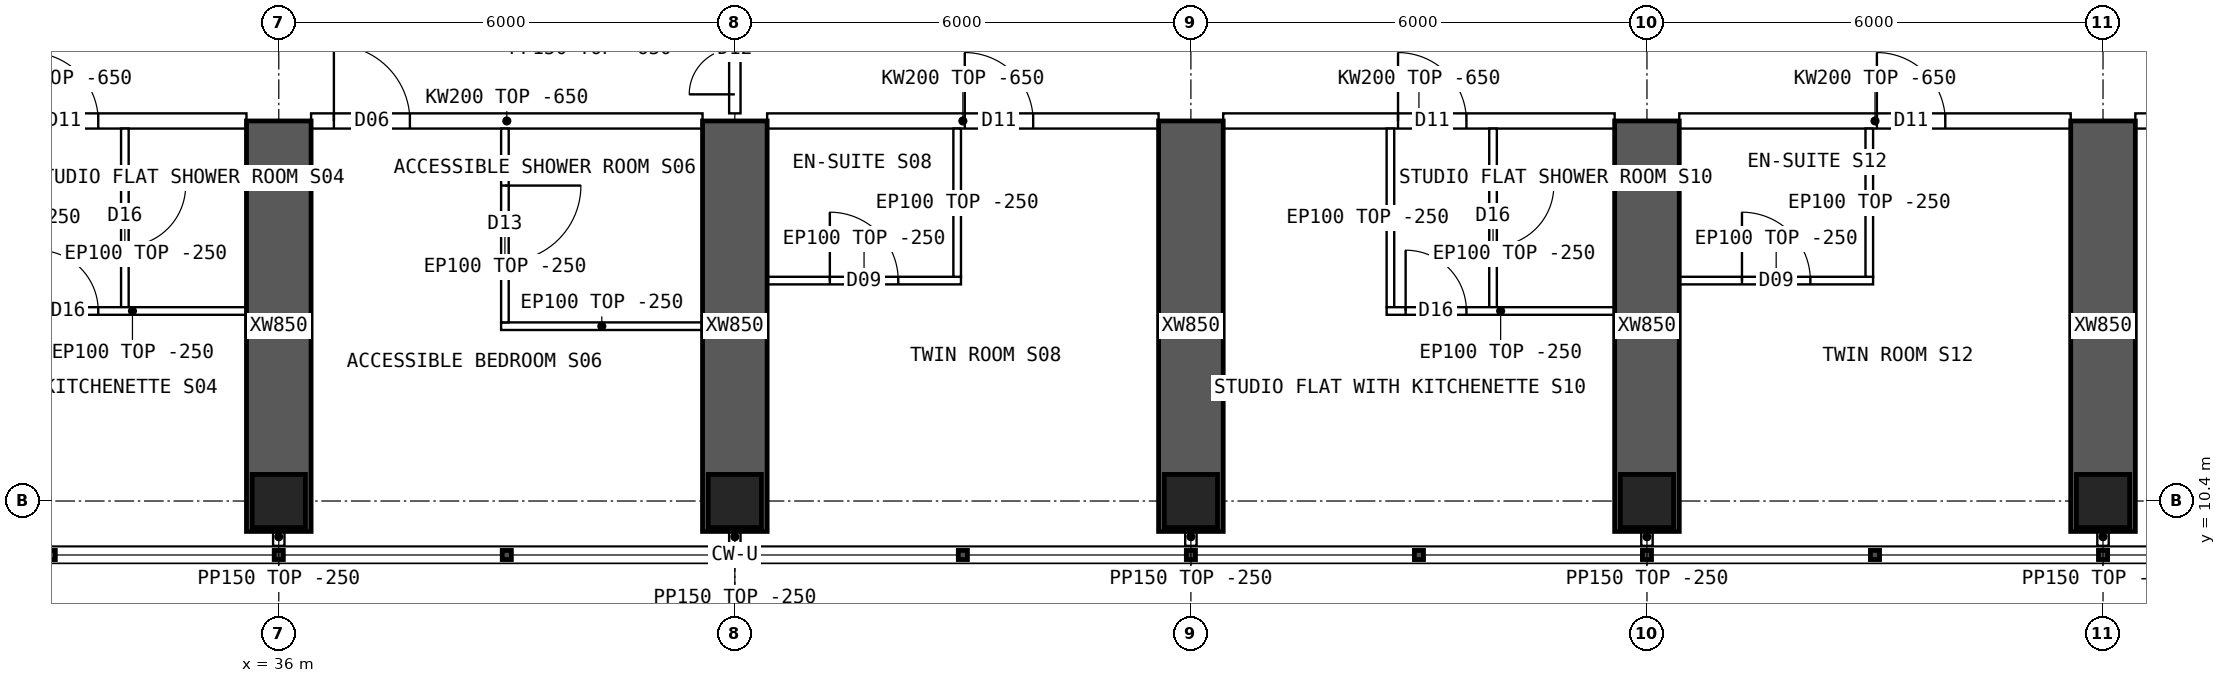
"""IFC4 building model, lengths in metres.
Left out: names, types, materials, properties, quantities, classifications, styles, units other than length and angle.
Written with IfcOpenShell. Run it as: python <this file> out.ifc"""

import sys

from ifc_helpers import new_model, si_unit, direction, frame, frame_2d, origin, origin_2d, place, context, subcontext, project, spatial, polyline, rectangle, hollow_rectangle, outline, extrude, element, fill, save


model = new_model("IFC4")
c1 = context("Model", 3, precision=1e-05, world=origin(), true_north=direction((0.0, 1.0)))
c2 = subcontext(c1, "Body", "Model", "MODEL_VIEW")
j1 = project(units=[si_unit("LENGTHUNIT", "METRE"), si_unit("PLANEANGLEUNIT", "RADIAN")], contexts=[c1])
p1 = place(None, origin())
s1 = spatial("IfcSite", under=j1, at=p1, CompositionType="ELEMENT")
p2 = place(p1, origin())
s2 = spatial("IfcBuilding", under=s1, at=p2, CompositionType="ELEMENT")
p3 = place(p2, frame((0.0, 0.0, 156.1)))
s3 = spatial("IfcBuildingStorey", under=s2, at=p3, CompositionType="ELEMENT", Elevation=156.1)
for number, where, z_axis, x_axis in (
    (1, (36.0, 10.4, 0.0), (0.0, 0.0, 1.0), (1.0, 0.0, 0.0)),
    (2, (42.0, 10.4, 0.0), (0.0, 0.0, 1.0), (1.0, 0.0, 0.0)),
    (3, (48.0, 10.4, 0.0), (0.0, 0.0, 1.0), (1.0, 0.0, 0.0)),
    (4, (54.0, 10.4, 0.0), (0.0, 0.0, 1.0), (1.0, 0.0, 0.0)),
    (5, (60.0, 10.4, 0.0), (0.0, 0.0, 1.0), (1.0, 0.0, 0.0)),
):
    element("IfcColumn", number, at=place(p3, frame(where, z_axis=z_axis, x_axis=x_axis)), inside=s3, PredefinedType="COLUMN", context=c2, shape_type="SweptSolid", body=[
        extrude(hollow_rectangle(XDim=0.7, YDim=0.7, WallThickness=0.07, at=origin_2d()), origin(), (0.0, 0.0, 1.0), 3.75),
    ])
for number, where, z_axis, x_axis in (
    (6, (36.0, 10.0, 0.0), (0.0, 0.0, 1.0), (0.0, 1.0, 0.0)),
    (7, (42.0, 10.0, 0.0), (0.0, 0.0, 1.0), (0.0, 1.0, 0.0)),
    (8, (48.0, 10.0, 0.0), (0.0, 0.0, 1.0), (0.0, 1.0, 0.0)),
    (9, (54.0, 10.0, 0.0), (0.0, 0.0, 1.0), (0.0, 1.0, 0.0)),
    (10, (60.0, 10.0, 0.0), (0.0, 0.0, 1.0), (0.0, 1.0, 0.0)),
):
    element("IfcWall", number, at=place(p3, frame(where, z_axis=z_axis, x_axis=x_axis)), inside=s3, PredefinedType="SHEAR", context=c2, shape_type="SweptSolid", body=[
        extrude(rectangle(XDim=5.4, YDim=0.85, at=frame_2d((2.7, 0.0))), origin(), (0.0, 0.0, 1.0), 3.75),
    ])
p4 = place(p3, frame((30.425, 15.4, 0.0), z_axis=(0.0, 0.0, 1.0), x_axis=(1.0, 0.0, 0.0)))
e11 = element("IfcWall", 11, at=p4, inside=s3, PredefinedType="SOLIDWALL", context=c2, shape_type="SweptSolid", body=[
    extrude(outline(polyline([(0.0, 0.0), (5.15, 0.0), (5.15, 3.1), (0.0, 3.1), (0.0, 0.0)])), frame((0.0, 0.1, 0.0), z_axis=(0.0, -1.0, 0.0), x_axis=(1.0, 0.0, 0.0)), (0.0, 0.0, 1.0), 0.2),
])
p5 = place(p4, frame((2.3, 0.0, 0.0)))
e12 = element("IfcOpeningElement", 12, at=p5, cuts=e11, PredefinedType="OPENING", context=c2, shape_type="SweptSolid", body=[
    extrude(rectangle(XDim=0.9, YDim=2.1, at=frame_2d((0.45, 1.05))), frame((0.0, 0.11, 0.0), z_axis=(0.0, -1.0, 0.0), x_axis=(1.0, 0.0, 0.0)), (0.0, 0.0, 1.0), 0.22),
])
p6 = place(p3, frame((36.425, 15.4, 0.0), z_axis=(0.0, 0.0, 1.0), x_axis=(1.0, 0.0, 0.0)))
e13 = element("IfcWall", 13, at=p6, inside=s3, PredefinedType="SOLIDWALL", context=c2, shape_type="SweptSolid", body=[
    extrude(outline(polyline([(0.0, 0.0), (5.15, 0.0), (5.15, 3.1), (0.0, 3.1), (0.0, 0.0)])), frame((0.0, 0.1, 0.0), z_axis=(0.0, -1.0, 0.0), x_axis=(1.0, 0.0, 0.0)), (0.0, 0.0, 1.0), 0.2),
])
p7 = place(p6, frame((0.3, 0.0, 0.0)))
e14 = element("IfcOpeningElement", 14, at=p7, cuts=e13, PredefinedType="OPENING", context=c2, shape_type="SweptSolid", body=[
    extrude(rectangle(XDim=1.0, YDim=2.1, at=frame_2d((0.5, 1.05))), frame((0.0, 0.11, 0.0), z_axis=(0.0, -1.0, 0.0), x_axis=(1.0, 0.0, 0.0)), (0.0, 0.0, 1.0), 0.22),
])
p8 = place(p3, frame((42.425, 15.4, 0.0), z_axis=(0.0, 0.0, 1.0), x_axis=(1.0, 0.0, 0.0)))
e15 = element("IfcWall", 15, at=p8, inside=s3, PredefinedType="SOLIDWALL", context=c2, shape_type="SweptSolid", body=[
    extrude(outline(polyline([(0.0, 0.0), (5.15, 0.0), (5.15, 3.1), (0.0, 3.1), (0.0, 0.0)])), frame((0.0, 0.1, 0.0), z_axis=(0.0, -1.0, 0.0), x_axis=(1.0, 0.0, 0.0)), (0.0, 0.0, 1.0), 0.2),
])
p9 = place(p8, frame((2.6, 0.0, 0.0)))
e16 = element("IfcOpeningElement", 16, at=p9, cuts=e15, PredefinedType="OPENING", context=c2, shape_type="SweptSolid", body=[
    extrude(rectangle(XDim=0.9, YDim=2.1, at=frame_2d((0.45, 1.05))), frame((0.0, 0.11, 0.0), z_axis=(0.0, -1.0, 0.0), x_axis=(1.0, 0.0, 0.0)), (0.0, 0.0, 1.0), 0.22),
])
p10 = place(p3, frame((48.425, 15.4, 0.0), z_axis=(0.0, 0.0, 1.0), x_axis=(1.0, 0.0, 0.0)))
e17 = element("IfcWall", 17, at=p10, inside=s3, PredefinedType="SOLIDWALL", context=c2, shape_type="SweptSolid", body=[
    extrude(outline(polyline([(0.0, 0.0), (5.15, 0.0), (5.15, 3.1), (0.0, 3.1), (0.0, 0.0)])), frame((0.0, 0.1, 0.0), z_axis=(0.0, -1.0, 0.0), x_axis=(1.0, 0.0, 0.0)), (0.0, 0.0, 1.0), 0.2),
])
p11 = place(p10, frame((2.3, 0.0, 0.0)))
e18 = element("IfcOpeningElement", 18, at=p11, cuts=e17, PredefinedType="OPENING", context=c2, shape_type="SweptSolid", body=[
    extrude(rectangle(XDim=0.9, YDim=2.1, at=frame_2d((0.45, 1.05))), frame((0.0, 0.11, 0.0), z_axis=(0.0, -1.0, 0.0), x_axis=(1.0, 0.0, 0.0)), (0.0, 0.0, 1.0), 0.22),
])
p12 = place(p3, frame((54.425, 15.4, 0.0), z_axis=(0.0, 0.0, 1.0), x_axis=(1.0, 0.0, 0.0)))
e19 = element("IfcWall", 19, at=p12, inside=s3, PredefinedType="SOLIDWALL", context=c2, shape_type="SweptSolid", body=[
    extrude(outline(polyline([(0.0, 0.0), (5.15, 0.0), (5.15, 3.1), (0.0, 3.1), (0.0, 0.0)])), frame((0.0, 0.1, 0.0), z_axis=(0.0, -1.0, 0.0), x_axis=(1.0, 0.0, 0.0)), (0.0, 0.0, 1.0), 0.2),
])
p13 = place(p12, frame((2.6, 0.0, 0.0)))
e20 = element("IfcOpeningElement", 20, at=p13, cuts=e19, PredefinedType="OPENING", context=c2, shape_type="SweptSolid", body=[
    extrude(rectangle(XDim=0.9, YDim=2.1, at=frame_2d((0.45, 1.05))), frame((0.0, 0.11, 0.0), z_axis=(0.0, -1.0, 0.0), x_axis=(1.0, 0.0, 0.0)), (0.0, 0.0, 1.0), 0.22),
])
p14 = place(p3, frame((60.425, 15.4, 0.0), z_axis=(0.0, 0.0, 1.0), x_axis=(1.0, 0.0, 0.0)))
e21 = element("IfcWall", 21, at=p14, inside=s3, PredefinedType="SOLIDWALL", context=c2, shape_type="SweptSolid", body=[
    extrude(outline(polyline([(0.0, 0.0), (5.15, 0.0), (5.15, 3.1), (0.0, 3.1), (0.0, 0.0)])), frame((0.0, 0.1, 0.0), z_axis=(0.0, -1.0, 0.0), x_axis=(1.0, 0.0, 0.0)), (0.0, 0.0, 1.0), 0.2),
])
p15 = place(p14, frame((0.6, 0.0, 0.0)))
e22 = element("IfcOpeningElement", 22, at=p15, cuts=e21, PredefinedType="OPENING", context=c2, shape_type="SweptSolid", body=[
    extrude(rectangle(XDim=1.0, YDim=2.1, at=frame_2d((0.5, 1.05))), frame((0.0, 0.11, 0.0), z_axis=(0.0, -1.0, 0.0), x_axis=(1.0, 0.0, 0.0)), (0.0, 0.0, 1.0), 0.22),
])
p16 = place(p3, frame((35.575, 12.9, 0.0), z_axis=(0.0, 0.0, 1.0), x_axis=(-1.0, 0.0, 0.0)))
e23 = element("IfcWall", 23, at=p16, inside=s3, PredefinedType="PARTITIONING", context=c2, shape_type="SweptSolid", body=[
    extrude(rectangle(XDim=3.0, YDim=0.1, at=frame_2d((1.5, 0.0))), origin(), (0.0, 0.0, 1.0), 3.5),
])
p17 = place(p16, frame((1.95, 0.0, 0.0)))
e24 = element("IfcOpeningElement", 24, at=p17, cuts=e23, PredefinedType="OPENING", context=c2, shape_type="SweptSolid", body=[
    extrude(rectangle(XDim=0.8, YDim=2.1, at=frame_2d((0.4, 1.05))), frame((0.0, 0.06, 0.0), z_axis=(0.0, -1.0, 0.0), x_axis=(1.0, 0.0, 0.0)), (0.0, 0.0, 1.0), 0.12),
])
p18 = place(p3, frame((33.975, 12.95, 0.0), z_axis=(0.0, 0.0, 1.0), x_axis=(0.0, 1.0, 0.0)))
e25 = element("IfcWall", 25, at=p18, inside=s3, PredefinedType="PARTITIONING", context=c2, shape_type="SweptSolid", body=[
    extrude(outline(polyline([(0.0, 0.0), (2.35, 0.0), (2.35, 3.1), (2.302, 3.1), (2.3, 3.5), (0.0, 3.5), (0.0, 0.0)])), frame((0.0, 0.05, 0.0), z_axis=(0.0, -1.0, 0.0), x_axis=(1.0, 0.0, 0.0)), (0.0, 0.0, 1.0), 0.1),
])
p19 = place(p18, frame((0.8, 0.0, 0.0)))
e26 = element("IfcOpeningElement", 26, at=p19, cuts=e25, PredefinedType="OPENING", context=c2, shape_type="SweptSolid", body=[
    extrude(rectangle(XDim=0.8, YDim=2.1, at=frame_2d((0.4, 1.05))), frame((0.0, 0.06, 0.0), z_axis=(0.0, -1.0, 0.0), x_axis=(1.0, 0.0, 0.0)), (0.0, 0.0, 1.0), 0.12),
])
p20 = place(p3, frame((38.925, 12.7, 0.0), z_axis=(0.0, 0.0, 1.0), x_axis=(1.0, 0.0, 0.0)))
e27 = element("IfcWall", 27, at=p20, inside=s3, PredefinedType="PARTITIONING", context=c2, shape_type="SweptSolid", body=[
    extrude(rectangle(XDim=2.65, YDim=0.1, at=frame_2d((1.325, 0.0))), origin(), (0.0, 0.0, 1.0), 3.5),
])
p21 = place(p3, frame((38.975, 12.75, 0.0), z_axis=(0.0, 0.0, 1.0), x_axis=(0.0, 1.0, 0.0)))
e28 = element("IfcWall", 28, at=p21, inside=s3, PredefinedType="PARTITIONING", context=c2, shape_type="SweptSolid", body=[
    extrude(outline(polyline([(0.0, 0.0), (2.55, 0.0), (2.55, 3.1), (2.502, 3.1), (2.5, 3.5), (0.0, 3.5), (0.0, 0.0)])), frame((0.0, 0.05, 0.0), z_axis=(0.0, -1.0, 0.0), x_axis=(1.0, 0.0, 0.0)), (0.0, 0.0, 1.0), 0.1),
])
p22 = place(p21, frame((0.8, 0.0, 0.0)))
e29 = element("IfcOpeningElement", 29, at=p22, cuts=e28, PredefinedType="OPENING", context=c2, shape_type="SweptSolid", body=[
    extrude(rectangle(XDim=1.0, YDim=2.1, at=frame_2d((0.5, 1.05))), frame((0.0, 0.06, 0.0), z_axis=(0.0, -1.0, 0.0), x_axis=(1.0, 0.0, 0.0)), (0.0, 0.0, 1.0), 0.12),
])
p23 = place(p3, frame((44.975, 13.3, 0.0), z_axis=(0.0, 0.0, 1.0), x_axis=(-1.0, 0.0, 0.0)))
e30 = element("IfcWall", 30, at=p23, inside=s3, PredefinedType="PARTITIONING", context=c2, shape_type="SweptSolid", body=[
    extrude(rectangle(XDim=2.55, YDim=0.1, at=frame_2d((1.275, 0.0))), origin(), (0.0, 0.0, 1.0), 3.5),
])
p24 = place(p23, frame((0.825, 0.0, 0.0)))
e31 = element("IfcOpeningElement", 31, at=p24, cuts=e30, PredefinedType="OPENING", context=c2, shape_type="SweptSolid", body=[
    extrude(rectangle(XDim=0.9, YDim=2.1, at=frame_2d((0.45, 1.05))), frame((0.0, 0.06, 0.0), z_axis=(0.0, -1.0, 0.0), x_axis=(1.0, 0.0, 0.0)), (0.0, 0.0, 1.0), 0.12),
])
p25 = place(p3, frame((44.925, 13.35, 0.0), z_axis=(0.0, 0.0, 1.0), x_axis=(0.0, 1.0, 0.0)))
e32 = element("IfcWall", 32, at=p25, inside=s3, PredefinedType="PARTITIONING", context=c2, shape_type="SweptSolid", body=[
    extrude(outline(polyline([(0.0, 0.0), (1.95, 0.0), (1.95, 3.1), (1.902, 3.1), (1.9, 3.5), (0.0, 3.5), (0.0, 0.0)])), frame((0.0, 0.05, 0.0), z_axis=(0.0, -1.0, 0.0), x_axis=(1.0, 0.0, 0.0)), (0.0, 0.0, 1.0), 0.1),
])
p26 = place(p3, frame((53.575, 12.9, 0.0), z_axis=(0.0, 0.0, 1.0), x_axis=(-1.0, 0.0, 0.0)))
e33 = element("IfcWall", 33, at=p26, inside=s3, PredefinedType="PARTITIONING", context=c2, shape_type="SweptSolid", body=[
    extrude(rectangle(XDim=3.0, YDim=0.1, at=frame_2d((1.5, 0.0))), origin(), (0.0, 0.0, 1.0), 3.5),
])
p27 = place(p26, frame((1.95, 0.0, 0.0)))
e34 = element("IfcOpeningElement", 34, at=p27, cuts=e33, PredefinedType="OPENING", context=c2, shape_type="SweptSolid", body=[
    extrude(rectangle(XDim=0.8, YDim=2.1, at=frame_2d((0.4, 1.05))), frame((0.0, 0.06, 0.0), z_axis=(0.0, -1.0, 0.0), x_axis=(1.0, 0.0, 0.0)), (0.0, 0.0, 1.0), 0.12),
])
p28 = place(p3, frame((50.625, 12.95, 0.0), z_axis=(0.0, 0.0, 1.0), x_axis=(0.0, 1.0, 0.0)))
e35 = element("IfcWall", 35, at=p28, inside=s3, PredefinedType="PARTITIONING", context=c2, shape_type="SweptSolid", body=[
    extrude(outline(polyline([(0.0, 0.0), (2.35, 0.0), (2.35, 3.1), (2.302, 3.1), (2.3, 3.5), (0.0, 3.5), (0.0, 0.0)])), frame((0.0, 0.05, 0.0), z_axis=(0.0, -1.0, 0.0), x_axis=(1.0, 0.0, 0.0)), (0.0, 0.0, 1.0), 0.1),
])
p29 = place(p3, frame((51.975, 12.95, 0.0), z_axis=(0.0, 0.0, 1.0), x_axis=(0.0, 1.0, 0.0)))
e36 = element("IfcWall", 36, at=p29, inside=s3, PredefinedType="PARTITIONING", context=c2, shape_type="SweptSolid", body=[
    extrude(outline(polyline([(0.0, 0.0), (2.35, 0.0), (2.35, 3.1), (2.302, 3.1), (2.3, 3.5), (0.0, 3.5), (0.0, 0.0)])), frame((0.0, 0.05, 0.0), z_axis=(0.0, -1.0, 0.0), x_axis=(1.0, 0.0, 0.0)), (0.0, 0.0, 1.0), 0.1),
])
p30 = place(p29, frame((0.8, 0.0, 0.0)))
e37 = element("IfcOpeningElement", 37, at=p30, cuts=e36, PredefinedType="OPENING", context=c2, shape_type="SweptSolid", body=[
    extrude(rectangle(XDim=0.8, YDim=2.1, at=frame_2d((0.4, 1.05))), frame((0.0, 0.06, 0.0), z_axis=(0.0, -1.0, 0.0), x_axis=(1.0, 0.0, 0.0)), (0.0, 0.0, 1.0), 0.12),
])
p31 = place(p3, frame((56.975, 13.3, 0.0), z_axis=(0.0, 0.0, 1.0), x_axis=(-1.0, 0.0, 0.0)))
e38 = element("IfcWall", 38, at=p31, inside=s3, PredefinedType="PARTITIONING", context=c2, shape_type="SweptSolid", body=[
    extrude(rectangle(XDim=2.55, YDim=0.1, at=frame_2d((1.275, 0.0))), origin(), (0.0, 0.0, 1.0), 3.5),
])
p32 = place(p31, frame((0.825, 0.0, 0.0)))
e39 = element("IfcOpeningElement", 39, at=p32, cuts=e38, PredefinedType="OPENING", context=c2, shape_type="SweptSolid", body=[
    extrude(rectangle(XDim=0.9, YDim=2.1, at=frame_2d((0.45, 1.05))), frame((0.0, 0.06, 0.0), z_axis=(0.0, -1.0, 0.0), x_axis=(1.0, 0.0, 0.0)), (0.0, 0.0, 1.0), 0.12),
])
p33 = place(p3, frame((56.925, 13.35, 0.0), z_axis=(0.0, 0.0, 1.0), x_axis=(0.0, 1.0, 0.0)))
e40 = element("IfcWall", 40, at=p33, inside=s3, PredefinedType="PARTITIONING", context=c2, shape_type="SweptSolid", body=[
    extrude(outline(polyline([(0.0, 0.0), (1.95, 0.0), (1.95, 3.1), (1.902, 3.1), (1.9, 3.5), (0.0, 3.5), (0.0, 0.0)])), frame((0.0, 0.05, 0.0), z_axis=(0.0, -1.0, 0.0), x_axis=(1.0, 0.0, 0.0)), (0.0, 0.0, 1.0), 0.1),
])
p34 = place(p3, frame((42.0, 15.5, 0.0), z_axis=(0.0, 0.0, 1.0), x_axis=(0.0, 1.0, 0.0)))
e41 = element("IfcWall", 41, at=p34, inside=s3, PredefinedType="PARTITIONING", context=c2, shape_type="SweptSolid", body=[
    extrude(outline(polyline([(0.0, 0.0), (1.7, 0.0), (1.7, 3.1), (0.0, 3.1), (0.0, 0.0)])), frame((0.0, 0.075, 0.0), z_axis=(0.0, -1.0, 0.0), x_axis=(1.0, 0.0, 0.0)), (0.0, 0.0, 1.0), 0.15),
])
p35 = place(p34, frame((0.25, 0.0, 0.0)))
e42 = element("IfcOpeningElement", 42, at=p35, cuts=e41, PredefinedType="OPENING", context=c2, shape_type="SweptSolid", body=[
    extrude(rectangle(XDim=1.2, YDim=2.1, at=frame_2d((0.6, 1.05))), frame((0.0, 0.085, 0.0), z_axis=(0.0, -1.0, 0.0), x_axis=(1.0, 0.0, 0.0)), (0.0, 0.0, 1.0), 0.17),
])
for number, where, z_axis, x_axis in (
    (43, (36.0, 10.05, 0.0), (0.0, 0.0, 1.0), (0.0, -1.0, 0.0)),
    (44, (42.0, 10.05, 0.0), (0.0, 0.0, 1.0), (0.0, -1.0, 0.0)),
    (45, (48.0, 10.05, 0.0), (0.0, 0.0, 1.0), (0.0, -1.0, 0.0)),
    (46, (54.0, 10.05, 0.0), (0.0, 0.0, 1.0), (0.0, -1.0, 0.0)),
    (47, (60.0, 10.05, 0.0), (0.0, 0.0, 1.0), (0.0, -1.0, 0.0)),
):
    element("IfcWall", number, at=place(p3, frame(where, z_axis=z_axis, x_axis=x_axis)), inside=s3, PredefinedType="PARTITIONING", context=c2, shape_type="SweptSolid", body=[
        extrude(rectangle(XDim=0.24, YDim=0.15, at=frame_2d((0.12, 0.0))), origin(), (0.0, 0.0, 1.0), 3.5),
    ])
p36 = place(p17, origin())
e48 = element("IfcDoor", 48, at=p36, inside=s3, OperationType="SINGLE_SWING_RIGHT", PredefinedType="DOOR", context=c2, shape_type="SweptSolid", body=[
    extrude(rectangle(XDim=0.8, YDim=2.1, at=frame_2d((0.4, 1.05))), frame((0.0, 0.025, 0.0), z_axis=(0.0, -1.0, 0.0), x_axis=(1.0, 0.0, 0.0)), (0.0, 0.0, 1.0), 0.05),
])
fill(e24, e48)
p37 = place(p19, origin())
e49 = element("IfcDoor", 49, at=p37, inside=s3, OperationType="SINGLE_SWING_RIGHT", PredefinedType="DOOR", context=c2, shape_type="SweptSolid", body=[
    extrude(rectangle(XDim=0.8, YDim=2.1, at=frame_2d((0.4, 1.05))), frame((0.0, 0.025, 0.0), z_axis=(0.0, -1.0, 0.0), x_axis=(1.0, 0.0, 0.0)), (0.0, 0.0, 1.0), 0.05),
])
fill(e26, e49)
p38 = place(p5, origin())
e50 = element("IfcDoor", 50, at=p38, inside=s3, OperationType="SINGLE_SWING_LEFT", PredefinedType="DOOR", context=c2, shape_type="SweptSolid", body=[
    extrude(rectangle(XDim=0.9, YDim=2.1, at=frame_2d((0.45, 1.05))), frame((0.0, 0.025, 0.0), z_axis=(0.0, -1.0, 0.0), x_axis=(1.0, 0.0, 0.0)), (0.0, 0.0, 1.0), 0.05),
])
fill(e12, e50)
p39 = place(p22, origin())
e51 = element("IfcDoor", 51, at=p39, inside=s3, OperationType="SINGLE_SWING_RIGHT", PredefinedType="DOOR", context=c2, shape_type="SweptSolid", body=[
    extrude(rectangle(XDim=1.0, YDim=2.1, at=frame_2d((0.5, 1.05))), frame((0.0, 0.025, 0.0), z_axis=(0.0, -1.0, 0.0), x_axis=(1.0, 0.0, 0.0)), (0.0, 0.0, 1.0), 0.05),
])
fill(e29, e51)
p40 = place(p7, origin())
e52 = element("IfcDoor", 52, at=p40, inside=s3, OperationType="SINGLE_SWING_LEFT", PredefinedType="DOOR", context=c2, shape_type="SweptSolid", body=[
    extrude(rectangle(XDim=1.0, YDim=2.1, at=frame_2d((0.5, 1.05))), frame((0.0, 0.025, 0.0), z_axis=(0.0, -1.0, 0.0), x_axis=(1.0, 0.0, 0.0)), (0.0, 0.0, 1.0), 0.05),
])
fill(e14, e52)
p41 = place(p24, origin())
e53 = element("IfcDoor", 53, at=p41, inside=s3, OperationType="SINGLE_SWING_RIGHT", PredefinedType="DOOR", context=c2, shape_type="SweptSolid", body=[
    extrude(rectangle(XDim=0.9, YDim=2.1, at=frame_2d((0.45, 1.05))), frame((0.0, 0.025, 0.0), z_axis=(0.0, -1.0, 0.0), x_axis=(1.0, 0.0, 0.0)), (0.0, 0.0, 1.0), 0.05),
])
fill(e31, e53)
p42 = place(p9, origin())
e54 = element("IfcDoor", 54, at=p42, inside=s3, OperationType="SINGLE_SWING_LEFT", PredefinedType="DOOR", context=c2, shape_type="SweptSolid", body=[
    extrude(rectangle(XDim=0.9, YDim=2.1, at=frame_2d((0.45, 1.05))), frame((0.0, 0.025, 0.0), z_axis=(0.0, -1.0, 0.0), x_axis=(1.0, 0.0, 0.0)), (0.0, 0.0, 1.0), 0.05),
])
fill(e16, e54)
p43 = place(p27, origin())
e55 = element("IfcDoor", 55, at=p43, inside=s3, OperationType="SINGLE_SWING_RIGHT", PredefinedType="DOOR", context=c2, shape_type="SweptSolid", body=[
    extrude(rectangle(XDim=0.8, YDim=2.1, at=frame_2d((0.4, 1.05))), frame((0.0, 0.025, 0.0), z_axis=(0.0, -1.0, 0.0), x_axis=(1.0, 0.0, 0.0)), (0.0, 0.0, 1.0), 0.05),
])
fill(e34, e55)
p44 = place(p30, origin())
e56 = element("IfcDoor", 56, at=p44, inside=s3, OperationType="SINGLE_SWING_RIGHT", PredefinedType="DOOR", context=c2, shape_type="SweptSolid", body=[
    extrude(rectangle(XDim=0.8, YDim=2.1, at=frame_2d((0.4, 1.05))), frame((0.0, 0.025, 0.0), z_axis=(0.0, -1.0, 0.0), x_axis=(1.0, 0.0, 0.0)), (0.0, 0.0, 1.0), 0.05),
])
fill(e37, e56)
p45 = place(p11, origin())
e57 = element("IfcDoor", 57, at=p45, inside=s3, OperationType="SINGLE_SWING_LEFT", PredefinedType="DOOR", context=c2, shape_type="SweptSolid", body=[
    extrude(rectangle(XDim=0.9, YDim=2.1, at=frame_2d((0.45, 1.05))), frame((0.0, 0.025, 0.0), z_axis=(0.0, -1.0, 0.0), x_axis=(1.0, 0.0, 0.0)), (0.0, 0.0, 1.0), 0.05),
])
fill(e18, e57)
p46 = place(p32, origin())
e58 = element("IfcDoor", 58, at=p46, inside=s3, OperationType="SINGLE_SWING_RIGHT", PredefinedType="DOOR", context=c2, shape_type="SweptSolid", body=[
    extrude(rectangle(XDim=0.9, YDim=2.1, at=frame_2d((0.45, 1.05))), frame((0.0, 0.025, 0.0), z_axis=(0.0, -1.0, 0.0), x_axis=(1.0, 0.0, 0.0)), (0.0, 0.0, 1.0), 0.05),
])
fill(e39, e58)
p47 = place(p13, origin())
e59 = element("IfcDoor", 59, at=p47, inside=s3, OperationType="SINGLE_SWING_LEFT", PredefinedType="DOOR", context=c2, shape_type="SweptSolid", body=[
    extrude(rectangle(XDim=0.9, YDim=2.1, at=frame_2d((0.45, 1.05))), frame((0.0, 0.025, 0.0), z_axis=(0.0, -1.0, 0.0), x_axis=(1.0, 0.0, 0.0)), (0.0, 0.0, 1.0), 0.05),
])
fill(e20, e59)
p48 = place(p35, origin())
e60 = element("IfcDoor", 60, at=p48, inside=s3, OperationType="DOUBLE_DOOR_SINGLE_SWING", PredefinedType="DOOR", context=c2, shape_type="SweptSolid", body=[
    extrude(rectangle(XDim=1.2, YDim=2.1, at=frame_2d((0.6, 1.05))), frame((0.0, 0.025, 0.0), z_axis=(0.0, -1.0, 0.0), x_axis=(1.0, 0.0, 0.0)), (0.0, 0.0, 1.0), 0.05),
])
fill(e42, e60)
save(model, sys.argv[1])
